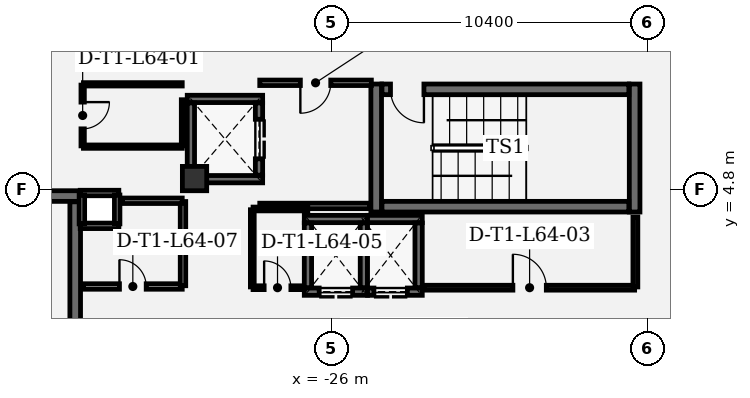
"""IFC4 building model, lengths in metres.
Left out: names, types, materials, properties, quantities, classifications, styles, units other than length and angle.
Written with IfcOpenShell. Run it as: python <this file> out.ifc"""

import sys

from ifc_helpers import new_model, si_unit, direction, frame, frame_2d, origin, origin_2d, place, context, subcontext, project, spatial, rectangle, extrude, element, fill, save


model = new_model("IFC4")
c1 = context("Model", 3, precision=1e-05, world=origin(), true_north=direction((0.0, 1.0)))
c2 = subcontext(c1, "Body", "Model", "MODEL_VIEW")
j1 = project(units=[si_unit("LENGTHUNIT", "METRE"), si_unit("PLANEANGLEUNIT", "RADIAN")], contexts=[c1])
p1 = place(None, origin())
s1 = spatial("IfcSite", under=j1, at=p1, CompositionType="ELEMENT")
p2 = place(p1, origin())
s2 = spatial("IfcBuilding", under=s1, at=p2, CompositionType="ELEMENT")
p3 = place(p2, frame((0.0, 0.0, 276.6)))
s3 = spatial("IfcBuildingStorey", under=s2, at=p3, CompositionType="ELEMENT", Elevation=276.6)
p4 = place(p3, frame((-30.5, 5.15, 0.0), z_axis=(0.0, 0.0, 1.0), x_axis=(1.0, 0.0, 0.0)))
e1 = element("IfcColumn", 1, at=p4, inside=s3, PredefinedType="COLUMN", context=c2, shape_type="SweptSolid", body=[
    extrude(rectangle(XDim=0.8, YDim=0.8, at=origin_2d()), origin(), (0.0, 0.0, 1.0), 4.2),
])
for number, where, z_axis, x_axis in (
    (2, (-24.525, 8.26, 0.0), (0.0, 0.0, 1.0), (0.0, -1.0, 0.0)),
    (3, (-16.025, 4.05, 0.0), (0.0, 0.0, 1.0), (0.0, 1.0, 0.0)),
):
    element("IfcWall", number, at=place(p3, frame(where, z_axis=z_axis, x_axis=x_axis)), inside=s3, PredefinedType="SHEAR", context=c2, shape_type="SweptSolid", body=[
        extrude(rectangle(XDim=4.21, YDim=0.35, at=frame_2d((2.105, 0.0))), origin(), (0.0, 0.0, 1.0), 3.91),
    ])
p5 = place(p3, frame((-24.335, 4.225, 0.0), z_axis=(0.0, 0.0, 1.0), x_axis=(1.0, 0.0, 0.0)))
e4 = element("IfcWall", 4, at=p5, inside=s3, PredefinedType="SHEAR", context=c2, shape_type="SweptSolid", body=[
    extrude(rectangle(XDim=8.12, YDim=0.35, at=frame_2d((4.06, 0.0))), origin(), (0.0, 0.0, 1.0), 3.91),
])
p6 = place(p3, frame((-16.215, 8.085, 0.0), z_axis=(0.0, 0.0, 1.0), x_axis=(-1.0, 0.0, 0.0)))
e5 = element("IfcWall", 5, at=p6, inside=s3, PredefinedType="SHEAR", context=c2, shape_type="SweptSolid", body=[
    extrude(rectangle(XDim=8.12, YDim=0.35, at=frame_2d((4.06, 0.0))), origin(), (0.0, 0.0, 1.0), 3.91),
])
p7 = place(p6, frame((6.74, 0.0, 0.0)))
e6 = element("IfcOpeningElement", 6, at=p7, cuts=e5, PredefinedType="OPENING", context=c2, shape_type="SweptSolid", body=[
    extrude(rectangle(XDim=1.1, YDim=2.2, at=frame_2d((0.55, 1.1))), frame((0.0, 0.185, 0.0), z_axis=(0.0, -1.0, 0.0), x_axis=(1.0, 0.0, 0.0)), (0.0, 0.0, 1.0), 0.37),
])
p8 = place(p3, frame((-34.25, 4.575, 0.0), z_axis=(0.0, 0.0, 1.0), x_axis=(-1.0, 0.0, 0.0)))
e7 = element("IfcWall", 7, at=p8, inside=s3, PredefinedType="SHEAR", context=c2, shape_type="SweptSolid", body=[
    extrude(rectangle(XDim=4.21, YDim=0.35, at=frame_2d((2.105, 0.0))), origin(), (0.0, 0.0, 1.0), 3.91),
])
p9 = place(p3, frame((-34.425, -4.385, 0.0), z_axis=(0.0, 0.0, 1.0), x_axis=(0.0, 1.0, 0.0)))
e8 = element("IfcWall", 8, at=p9, inside=s3, PredefinedType="SHEAR", context=c2, shape_type="SweptSolid", body=[
    extrude(rectangle(XDim=8.77, YDim=0.35, at=frame_2d((4.385, 0.0))), origin(), (0.0, 0.0, 1.0), 3.91),
])
for number, where, z_axis, x_axis in (
    (9, (-28.26, 5.13, 0.0), (0.0, 0.0, 1.0), (-1.0, 0.0, 0.0)),
    (10, (-30.74, 7.77, 0.0), (0.0, 0.0, 1.0), (1.0, 0.0, 0.0)),
):
    element("IfcWall", number, at=place(p3, frame(where, z_axis=z_axis, x_axis=x_axis)), inside=s3, PredefinedType="SHEAR", context=c2, shape_type="SweptSolid", body=[
        extrude(rectangle(XDim=2.48, YDim=0.24, at=frame_2d((1.24, 0.0))), origin(), (0.0, 0.0, 1.0), 3.91),
    ])
p10 = place(p3, frame((-30.62, 5.262, 0.0), z_axis=(0.0, 0.0, 1.0), x_axis=(0.0, 1.0, 0.0)))
e11 = element("IfcWall", 11, at=p10, inside=s3, PredefinedType="SHEAR", context=c2, shape_type="SweptSolid", body=[
    extrude(rectangle(XDim=2.376, YDim=0.24, at=frame_2d((1.188, 0.0))), origin(), (0.0, 0.0, 1.0), 3.91),
])
p11 = place(p3, frame((-28.38, 7.638, 0.0), z_axis=(0.0, 0.0, 1.0), x_axis=(0.0, -1.0, 0.0)))
e12 = element("IfcWall", 12, at=p11, inside=s3, PredefinedType="SHEAR", context=c2, shape_type="SweptSolid", body=[
    extrude(rectangle(XDim=2.376, YDim=0.24, at=frame_2d((1.188, 0.0))), origin(), (0.0, 0.0, 1.0), 3.91),
])
p12 = place(p11, frame((0.538, 0.0, 0.0)))
e13 = element("IfcOpeningElement", 13, at=p12, cuts=e12, PredefinedType="OPENING", context=c2, shape_type="SweptSolid", body=[
    extrude(rectangle(XDim=1.3, YDim=2.3, at=frame_2d((0.65, 1.15))), frame((0.0, 0.13, 0.0), z_axis=(0.0, -1.0, 0.0), x_axis=(1.0, 0.0, 0.0)), (0.0, 0.0, 1.0), 0.26),
])
p13 = place(p3, frame((-24.81, 1.43, 0.0), z_axis=(0.0, 0.0, 1.0), x_axis=(-1.0, 0.0, 0.0)))
e14 = element("IfcWall", 14, at=p13, inside=s3, PredefinedType="SHEAR", context=c2, shape_type="SweptSolid", body=[
    extrude(rectangle(XDim=2.08, YDim=0.24, at=frame_2d((1.04, 0.0))), origin(), (0.0, 0.0, 1.0), 3.91),
])
p14 = place(p13, frame((0.49, 0.0, 0.0)))
e15 = element("IfcOpeningElement", 15, at=p14, cuts=e14, PredefinedType="OPENING", context=c2, shape_type="SweptSolid", body=[
    extrude(rectangle(XDim=1.1, YDim=2.2, at=frame_2d((0.55, 1.1))), frame((0.0, 0.13, 0.0), z_axis=(0.0, -1.0, 0.0), x_axis=(1.0, 0.0, 0.0)), (0.0, 0.0, 1.0), 0.26),
])
p15 = place(p3, frame((-26.89, 3.82, 0.0), z_axis=(0.0, 0.0, 1.0), x_axis=(1.0, 0.0, 0.0)))
e16 = element("IfcWall", 16, at=p15, inside=s3, PredefinedType="SHEAR", context=c2, shape_type="SweptSolid", body=[
    extrude(rectangle(XDim=2.08, YDim=0.24, at=frame_2d((1.04, 0.0))), origin(), (0.0, 0.0, 1.0), 3.91),
])
for number, where, z_axis, x_axis in (
    (17, (-26.77, 1.562, 0.0), (0.0, 0.0, 1.0), (0.0, 1.0, 0.0)),
    (18, (-24.93, 3.688, 0.0), (0.0, 0.0, 1.0), (0.0, -1.0, 0.0)),
):
    element("IfcWall", number, at=place(p3, frame(where, z_axis=z_axis, x_axis=x_axis)), inside=s3, PredefinedType="SHEAR", context=c2, shape_type="SweptSolid", body=[
        extrude(rectangle(XDim=2.126, YDim=0.24, at=frame_2d((1.063, 0.0))), origin(), (0.0, 0.0, 1.0), 3.91),
    ])
p16 = place(p3, frame((-23.01, 1.43, 0.0), z_axis=(0.0, 0.0, 1.0), x_axis=(-1.0, 0.0, 0.0)))
e19 = element("IfcWall", 19, at=p16, inside=s3, PredefinedType="SHEAR", context=c2, shape_type="SweptSolid", body=[
    extrude(rectangle(XDim=1.8, YDim=0.24, at=frame_2d((0.9, 0.0))), origin(), (0.0, 0.0, 1.0), 3.91),
])
p17 = place(p16, frame((0.49, 0.0, 0.0)))
e20 = element("IfcOpeningElement", 20, at=p17, cuts=e19, PredefinedType="OPENING", context=c2, shape_type="SweptSolid", body=[
    extrude(rectangle(XDim=1.1, YDim=2.2, at=frame_2d((0.55, 1.1))), frame((0.0, 0.13, 0.0), z_axis=(0.0, -1.0, 0.0), x_axis=(1.0, 0.0, 0.0)), (0.0, 0.0, 1.0), 0.26),
])
p18 = place(p3, frame((-24.81, 3.82, 0.0), z_axis=(0.0, 0.0, 1.0), x_axis=(1.0, 0.0, 0.0)))
e21 = element("IfcWall", 21, at=p18, inside=s3, PredefinedType="SHEAR", context=c2, shape_type="SweptSolid", body=[
    extrude(rectangle(XDim=1.8, YDim=0.24, at=frame_2d((0.9, 0.0))), origin(), (0.0, 0.0, 1.0), 3.91),
])
p19 = place(p3, frame((-23.13, 3.688, 0.0), z_axis=(0.0, 0.0, 1.0), x_axis=(0.0, -1.0, 0.0)))
e22 = element("IfcWall", 22, at=p19, inside=s3, PredefinedType="SHEAR", context=c2, shape_type="SweptSolid", body=[
    extrude(rectangle(XDim=2.126, YDim=0.24, at=frame_2d((1.063, 0.0))), origin(), (0.0, 0.0, 1.0), 3.91),
])
for number, where, z_axis, x_axis in (
    (23, (-32.99, 3.595, 0.0), (0.0, 0.0, 1.0), (-1.0, 0.0, 0.0)),
    (24, (-34.26, 4.675, 0.0), (0.0, 0.0, 1.0), (1.0, 0.0, 0.0)),
):
    element("IfcWall", number, at=place(p3, frame(where, z_axis=z_axis, x_axis=x_axis)), inside=s3, PredefinedType="PARTITIONING", context=c2, shape_type="SweptSolid", body=[
        extrude(rectangle(XDim=1.27, YDim=0.18, at=frame_2d((0.635, 0.0))), origin(), (0.0, 0.0, 1.0), 3.91),
    ])
for number, where, z_axis, x_axis in (
    (25, (-34.205, 3.66, 0.0), (0.0, 0.0, 1.0), (0.0, 1.0, 0.0)),
    (26, (-33.045, 4.61, 0.0), (0.0, 0.0, 1.0), (0.0, -1.0, 0.0)),
):
    element("IfcWall", number, at=place(p3, frame(where, z_axis=z_axis, x_axis=x_axis)), inside=s3, PredefinedType="PARTITIONING", context=c2, shape_type="SweptSolid", body=[
        extrude(rectangle(XDim=0.95, YDim=0.18, at=frame_2d((0.475, 0.0))), origin(), (0.0, 0.0, 1.0), 3.91),
    ])
p20 = place(p3, frame((-28.355, 4.25, 0.0), z_axis=(0.0, 0.0, 1.0), x_axis=(1.0, 0.0, 0.0)))
e27 = element("IfcWall", 27, at=p20, inside=s3, PredefinedType="PARTITIONING", context=c2, shape_type="SweptSolid", body=[
    extrude(rectangle(XDim=3.622, YDim=0.18, at=frame_2d((1.811, 0.0))), origin(), (0.0, 0.0, 1.0), 3.91),
])
p21 = place(p3, frame((-24.684, 8.3, 0.0), z_axis=(0.0, 0.0, 1.0), x_axis=(-1.0, 0.0, 0.0)))
e28 = element("IfcWall", 28, at=p21, inside=s3, PredefinedType="PARTITIONING", context=c2, shape_type="SweptSolid", body=[
    extrude(rectangle(XDim=3.671, YDim=0.18, at=frame_2d((1.835, 0.0))), origin(), (0.0, 0.0, 1.0), 3.529),
])
p22 = place(p21, frame((1.335, 0.0, 0.0)))
e29 = element("IfcOpeningElement", 29, at=p22, cuts=e28, PredefinedType="OPENING", context=c2, shape_type="SweptSolid", body=[
    extrude(rectangle(XDim=1.0, YDim=2.15, at=frame_2d((0.5, 1.075))), frame((0.0, 0.1, 0.0), z_axis=(0.0, -1.0, 0.0), x_axis=(1.0, 0.0, 0.0)), (0.0, 0.0, 1.0), 0.2),
])
p23 = place(p3, frame((-34.18, 8.225, 0.0), z_axis=(0.0, 0.0, 1.0), x_axis=(0.0, -1.0, 0.0)))
e30 = element("IfcWall", 30, at=p23, inside=s3, PredefinedType="PARTITIONING", context=c2, shape_type="SweptSolid", body=[
    extrude(rectangle(XDim=2.0, YDim=0.11, at=frame_2d((1.0, 0.0))), origin(), (0.0, 0.0, 1.0), 3.91),
])
p24 = place(p23, frame((0.56, 0.0, 0.0)))
e31 = element("IfcOpeningElement", 31, at=p24, cuts=e30, PredefinedType="OPENING", context=c2, shape_type="SweptSolid", body=[
    extrude(rectangle(XDim=0.88, YDim=2.1, at=frame_2d((0.44, 1.05))), frame((0.0, 0.065, 0.0), z_axis=(0.0, -1.0, 0.0), x_axis=(1.0, 0.0, 0.0)), (0.0, 0.0, 1.0), 0.13),
])
p25 = place(p3, frame((-34.155, 6.2, 0.0), z_axis=(0.0, 0.0, 1.0), x_axis=(1.0, 0.0, 0.0)))
e32 = element("IfcWall", 32, at=p25, inside=s3, PredefinedType="PARTITIONING", context=c2, shape_type="SweptSolid", body=[
    extrude(rectangle(XDim=3.25, YDim=0.11, at=frame_2d((1.625, 0.0))), origin(), (0.0, 0.0, 1.0), 3.91),
])
p26 = place(p3, frame((-30.88, 6.225, 0.0), z_axis=(0.0, 0.0, 1.0), x_axis=(0.0, 1.0, 0.0)))
e33 = element("IfcWall", 33, at=p26, inside=s3, PredefinedType="PARTITIONING", context=c2, shape_type="SweptSolid", body=[
    extrude(rectangle(XDim=1.518, YDim=0.11, at=frame_2d((0.759, 0.0))), origin(), (0.0, 0.0, 1.0), 3.91),
])
p27 = place(p3, frame((-30.905, 8.25, 0.0), z_axis=(0.0, 0.0, 1.0), x_axis=(-1.0, 0.0, 0.0)))
e34 = element("IfcWall", 34, at=p27, inside=s3, PredefinedType="PARTITIONING", context=c2, shape_type="SweptSolid", body=[
    extrude(rectangle(XDim=3.25, YDim=0.11, at=frame_2d((1.625, 0.0))), origin(), (0.0, 0.0, 1.0), 3.529),
])
p28 = place(p3, frame((-22.934, 1.56, 0.0), z_axis=(0.0, 0.0, 1.0), x_axis=(1.0, 0.0, 0.0)))
e35 = element("IfcWall", 35, at=p28, inside=s3, PredefinedType="PARTITIONING", context=c2, shape_type="SweptSolid", body=[
    extrude(rectangle(XDim=6.909, YDim=0.16, at=frame_2d((3.455, 0.0))), origin(), (0.0, 0.0, 1.0), 3.91),
])
p29 = place(p28, frame((2.905, 0.0, 0.0)))
e36 = element("IfcOpeningElement", 36, at=p29, cuts=e35, PredefinedType="OPENING", context=c2, shape_type="SweptSolid", body=[
    extrude(rectangle(XDim=1.1, YDim=2.15, at=frame_2d((0.55, 1.075))), frame((0.0, 0.09, 0.0), z_axis=(0.0, -1.0, 0.0), x_axis=(1.0, 0.0, 0.0)), (0.0, 0.0, 1.0), 0.18),
])
p30 = place(p3, frame((-16.0, 1.585, 0.0), z_axis=(0.0, 0.0, 1.0), x_axis=(0.0, 1.0, 0.0)))
e37 = element("IfcWall", 37, at=p30, inside=s3, PredefinedType="PARTITIONING", context=c2, shape_type="SweptSolid", body=[
    extrude(rectangle(XDim=2.302, YDim=0.16, at=frame_2d((1.151, 0.0))), origin(), (0.0, 0.0, 1.0), 3.91),
])
p31 = place(p3, frame((-28.6, 4.125, 0.0), z_axis=(0.0, 0.0, 1.0), x_axis=(0.0, -1.0, 0.0)))
e38 = element("IfcWall", 38, at=p31, inside=s3, PredefinedType="PARTITIONING", context=c2, shape_type="SweptSolid", body=[
    extrude(rectangle(XDim=2.54, YDim=0.125, at=frame_2d((1.27, 0.0))), origin(), (0.0, 0.0, 1.0), 3.91),
])
p32 = place(p3, frame((-28.575, 1.56, 0.0), z_axis=(0.0, 0.0, 1.0), x_axis=(1.0, 0.0, 0.0)))
e39 = element("IfcWall", 39, at=p32, inside=s3, PredefinedType="PARTITIONING", context=c2, shape_type="SweptSolid", body=[
    extrude(rectangle(XDim=1.609, YDim=0.125, at=frame_2d((0.805, 0.0))), origin(), (0.0, 0.0, 1.0), 3.91),
])
p33 = place(p32, frame((0.365, 0.0, 0.0)))
e40 = element("IfcOpeningElement", 40, at=p33, cuts=e39, PredefinedType="OPENING", context=c2, shape_type="SweptSolid", body=[
    extrude(rectangle(XDim=0.88, YDim=2.1, at=frame_2d((0.44, 1.05))), frame((0.0, 0.073, 0.0), z_axis=(0.0, -1.0, 0.0), x_axis=(1.0, 0.0, 0.0)), (0.0, 0.0, 1.0), 0.145),
])
p34 = place(p3, frame((-26.775, 4.15, 0.0), z_axis=(0.0, 0.0, 1.0), x_axis=(-1.0, 0.0, 0.0)))
e41 = element("IfcWall", 41, at=p34, inside=s3, PredefinedType="PARTITIONING", context=c2, shape_type="SweptSolid", body=[
    extrude(rectangle(XDim=1.8, YDim=0.125, at=frame_2d((0.9, 0.0))), origin(), (0.0, 0.0, 1.0), 3.91),
])
p35 = place(p3, frame((-34.155, 1.6, 0.0), z_axis=(0.0, 0.0, 1.0), x_axis=(1.0, 0.0, 0.0)))
e42 = element("IfcWall", 42, at=p35, inside=s3, PredefinedType="PARTITIONING", context=c2, shape_type="SweptSolid", body=[
    extrude(rectangle(XDim=3.25, YDim=0.18, at=frame_2d((1.625, 0.0))), origin(), (0.0, 0.0, 1.0), 3.91),
])
p36 = place(p35, frame((1.185, 0.0, 0.0)))
e43 = element("IfcOpeningElement", 43, at=p36, cuts=e42, PredefinedType="OPENING", context=c2, shape_type="SweptSolid", body=[
    extrude(rectangle(XDim=0.88, YDim=2.1, at=frame_2d((0.44, 1.05))), frame((0.0, 0.1, 0.0), z_axis=(0.0, -1.0, 0.0), x_axis=(1.0, 0.0, 0.0)), (0.0, 0.0, 1.0), 0.2),
])
p37 = place(p3, frame((-30.88, 1.625, 0.0), z_axis=(0.0, 0.0, 1.0), x_axis=(0.0, 1.0, 0.0)))
e44 = element("IfcWall", 44, at=p37, inside=s3, PredefinedType="PARTITIONING", context=c2, shape_type="SweptSolid", body=[
    extrude(rectangle(XDim=2.77, YDim=0.18, at=frame_2d((1.385, 0.0))), origin(), (0.0, 0.0, 1.0), 3.91),
])
p38 = place(p3, frame((-30.905, 4.42, 0.0), z_axis=(0.0, 0.0, 1.0), x_axis=(-1.0, 0.0, 0.0)))
e45 = element("IfcWall", 45, at=p38, inside=s3, PredefinedType="PARTITIONING", context=c2, shape_type="SweptSolid", body=[
    extrude(rectangle(XDim=1.975, YDim=0.18, at=frame_2d((0.988, 0.0))), origin(), (0.0, 0.0, 1.0), 3.91),
])
p39 = place(p7, origin())
e46 = element("IfcDoor", 46, at=p39, inside=s3, OperationType="SINGLE_SWING_LEFT", PredefinedType="DOOR", context=c2, shape_type="SweptSolid", body=[
    extrude(rectangle(XDim=1.1, YDim=2.2, at=frame_2d((0.55, 1.1))), frame((0.0, 0.025, 0.0), z_axis=(0.0, -1.0, 0.0), x_axis=(1.0, 0.0, 0.0)), (0.0, 0.0, 1.0), 0.05),
])
fill(e6, e46)
p40 = place(p12, origin())
e47 = element("IfcDoor", 47, at=p40, inside=s3, OperationType="DOUBLE_DOOR_SLIDING", PredefinedType="DOOR", context=c2, shape_type="SweptSolid", body=[
    extrude(rectangle(XDim=1.3, YDim=2.3, at=frame_2d((0.65, 1.15))), frame((0.0, 0.025, 0.0), z_axis=(0.0, -1.0, 0.0), x_axis=(1.0, 0.0, 0.0)), (0.0, 0.0, 1.0), 0.05),
])
fill(e13, e47)
p41 = place(p14, origin())
e48 = element("IfcDoor", 48, at=p41, inside=s3, OperationType="DOUBLE_DOOR_SLIDING", PredefinedType="DOOR", context=c2, shape_type="SweptSolid", body=[
    extrude(rectangle(XDim=1.1, YDim=2.2, at=frame_2d((0.55, 1.1))), frame((0.0, 0.025, 0.0), z_axis=(0.0, -1.0, 0.0), x_axis=(1.0, 0.0, 0.0)), (0.0, 0.0, 1.0), 0.05),
])
fill(e15, e48)
p42 = place(p17, origin())
e49 = element("IfcDoor", 49, at=p42, inside=s3, OperationType="DOUBLE_DOOR_SLIDING", PredefinedType="DOOR", context=c2, shape_type="SweptSolid", body=[
    extrude(rectangle(XDim=1.1, YDim=2.2, at=frame_2d((0.55, 1.1))), frame((0.0, 0.025, 0.0), z_axis=(0.0, -1.0, 0.0), x_axis=(1.0, 0.0, 0.0)), (0.0, 0.0, 1.0), 0.05),
])
fill(e20, e49)
p43 = place(p24, origin())
e50 = element("IfcDoor", 50, at=p43, inside=s3, OperationType="SINGLE_SWING_LEFT", PredefinedType="DOOR", context=c2, shape_type="SweptSolid", body=[
    extrude(rectangle(XDim=0.88, YDim=2.1, at=frame_2d((0.44, 1.05))), frame((0.0, 0.025, 0.0), z_axis=(0.0, -1.0, 0.0), x_axis=(1.0, 0.0, 0.0)), (0.0, 0.0, 1.0), 0.05),
])
fill(e31, e50)
p44 = place(p29, origin())
e51 = element("IfcDoor", 51, at=p44, inside=s3, OperationType="SINGLE_SWING_LEFT", PredefinedType="DOOR", context=c2, shape_type="SweptSolid", body=[
    extrude(rectangle(XDim=1.1, YDim=2.15, at=frame_2d((0.55, 1.075))), frame((0.0, 0.025, 0.0), z_axis=(0.0, -1.0, 0.0), x_axis=(1.0, 0.0, 0.0)), (0.0, 0.0, 1.0), 0.05),
])
fill(e36, e51)
p45 = place(p33, origin())
e52 = element("IfcDoor", 52, at=p45, inside=s3, OperationType="SINGLE_SWING_LEFT", PredefinedType="DOOR", context=c2, shape_type="SweptSolid", body=[
    extrude(rectangle(XDim=0.88, YDim=2.1, at=frame_2d((0.44, 1.05))), frame((0.0, 0.025, 0.0), z_axis=(0.0, -1.0, 0.0), x_axis=(1.0, 0.0, 0.0)), (0.0, 0.0, 1.0), 0.05),
])
fill(e40, e52)
p46 = place(p36, origin())
e53 = element("IfcDoor", 53, at=p46, inside=s3, OperationType="SINGLE_SWING_LEFT", PredefinedType="DOOR", context=c2, shape_type="SweptSolid", body=[
    extrude(rectangle(XDim=0.88, YDim=2.1, at=frame_2d((0.44, 1.05))), frame((0.0, 0.025, 0.0), z_axis=(0.0, -1.0, 0.0), x_axis=(1.0, 0.0, 0.0)), (0.0, 0.0, 1.0), 0.05),
])
fill(e43, e53)
p47 = place(p22, origin())
e54 = element("IfcDoor", 54, at=p47, inside=s3, OperationType="SINGLE_SWING_RIGHT", PredefinedType="DOOR", context=c2, shape_type="SweptSolid", body=[
    extrude(rectangle(XDim=1.0, YDim=2.15, at=frame_2d((0.5, 1.075))), frame((0.0, 0.025, 0.0), z_axis=(0.0, -1.0, 0.0), x_axis=(1.0, 0.0, 0.0)), (0.0, 0.0, 1.0), 0.05),
])
fill(e29, e54)
save(model, sys.argv[1])
